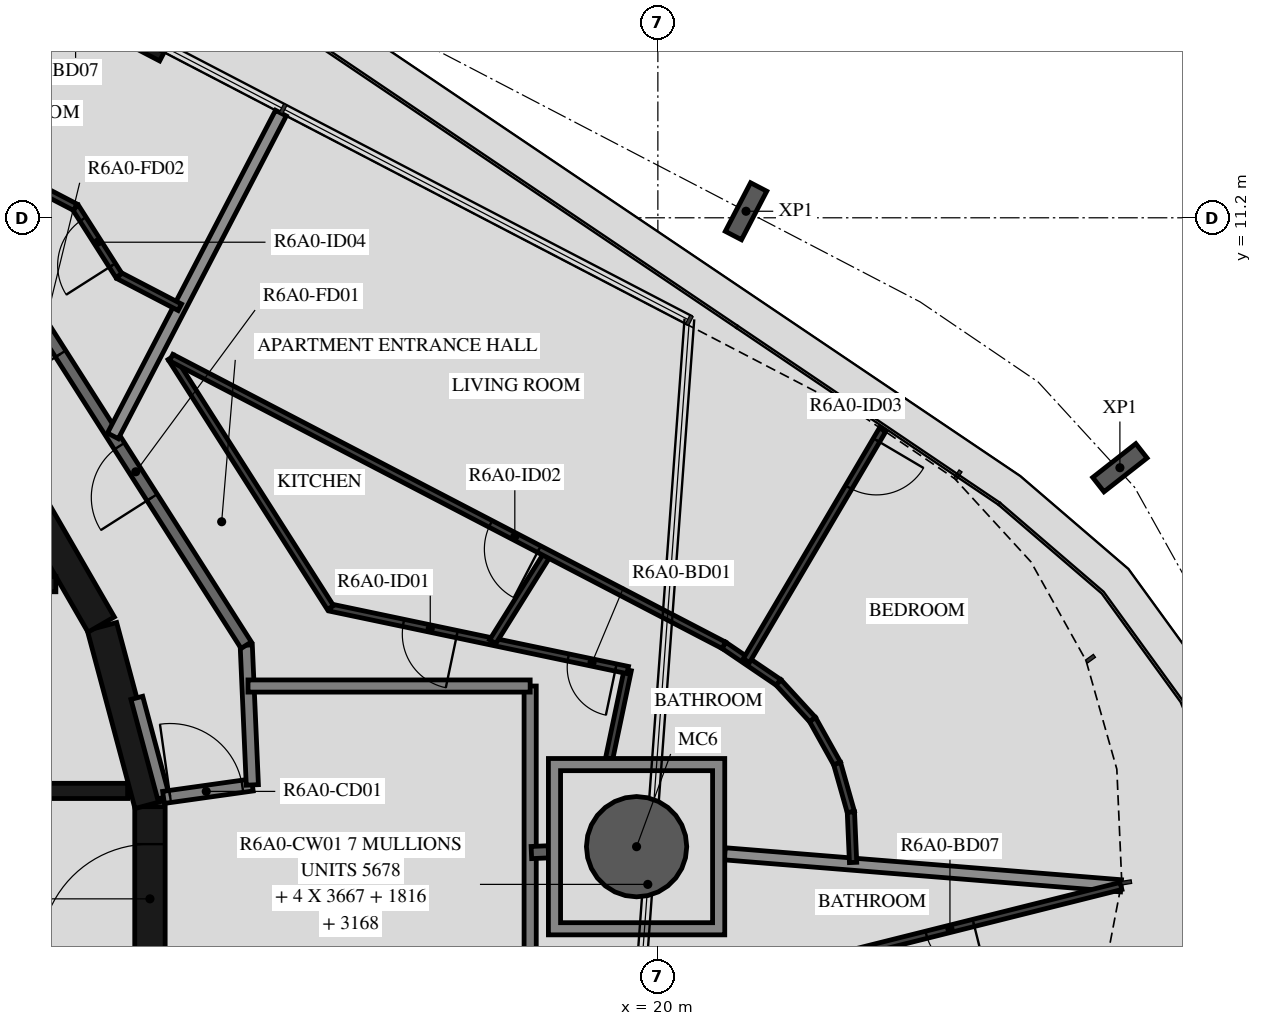
"""IFC4 building model, lengths in metres.
Left out: names, types, materials, properties, quantities, classifications, styles, units other than length and angle.
Written with IfcOpenShell. Run it as: python <this file> out.ifc"""

import sys

from ifc_helpers import new_model, si_unit, direction, frame, frame_2d, origin, origin_2d, place, context, subcontext, project, spatial, polyline, rectangle, hollow_circle, i_section, outline, extrude, element, fill, save


model = new_model("IFC4")
c1 = context("Model", 3, precision=1e-05, world=origin(), true_north=direction((0.0, 1.0)))
c2 = subcontext(c1, "Body", "Model", "MODEL_VIEW")
j1 = project(units=[si_unit("LENGTHUNIT", "METRE"), si_unit("PLANEANGLEUNIT", "RADIAN")], contexts=[c1])
p1 = place(None, origin())
s1 = spatial("IfcSite", under=j1, at=p1, CompositionType="ELEMENT")
p2 = place(p1, origin())
s2 = spatial("IfcBuilding", under=s1, at=p2, CompositionType="ELEMENT")
p3 = place(p2, frame((0.0, 0.0, 226.7)))
s3 = spatial("IfcBuildingStorey", under=s2, at=p3, CompositionType="ELEMENT", Elevation=226.7)
p4 = place(p3, frame((19.65, 0.858, -0.45), z_axis=(0.0, 0.0, 1.0), x_axis=(1.0, 0.0, 0.0)))
e1 = element("IfcColumn", 1, at=p4, inside=s3, PredefinedType="COLUMN", context=c2, shape_type="SweptSolid", body=[
    extrude(hollow_circle(Radius=0.825, WallThickness=0.04, at=origin_2d()), origin(), (0.0, 0.0, 1.0), 3.57),
])
for number, where, z_axis, x_axis in (
    (2, (27.598, 7.09, -0.45), (0.0, 0.0, 1.0), (0.617, -0.787, 0.0)),
    (3, (21.45, 11.308, -0.45), (0.0, 0.0, 1.0), (0.887, -0.462, 0.0)),
):
    element("IfcColumn", number, at=place(p3, frame(where, z_axis=z_axis, x_axis=x_axis)), inside=s3, PredefinedType="COLUMN", context=c2, shape_type="SweptSolid", body=[
        extrude(i_section(OverallWidth=0.3, OverallDepth=0.9, WebThickness=0.019, FlangeThickness=0.035, FilletRadius=0.03, at=origin_2d()), origin(), (0.0, 0.0, 1.0), 3.57),
    ])
p5 = place(p3, frame((11.844, 13.851, 0.0), z_axis=(0.0, 0.0, 1.0), x_axis=(-0.887014349583, 0.461741858221, 0.0)))
e4 = element("IfcWall", 4, at=p5, inside=s3, PredefinedType="STANDARD", context=c2, shape_type="SweptSolid", body=[
    extrude(rectangle(XDim=3.2, YDim=0.16, at=frame_2d((1.6, 0.0))), origin(), (0.0, 0.0, 1.0), 3.12),
])
p6 = place(p5, frame((0.4, 0.0, 0.0)))
e5 = element("IfcOpeningElement", 5, at=p6, cuts=e4, PredefinedType="OPENING", context=c2, shape_type="SweptSolid", body=[
    extrude(rectangle(XDim=2.4, YDim=2.4, at=frame_2d((1.2, 1.2))), frame((0.0, 0.09, 0.0), z_axis=(0.0, -1.0, 0.0), x_axis=(1.0, 0.0, 0.0)), (0.0, 0.0, 1.0), 0.18),
])
p7 = place(p3, frame((11.647, -1.516, 0.0), z_axis=(0.0, 0.0, 1.0), x_axis=(0.0, 1.0, 0.0)))
e6 = element("IfcWall", 6, at=p7, inside=s3, PredefinedType="SHEAR", context=c2, shape_type="SweptSolid", body=[
    extrude(rectangle(XDim=3.033, YDim=0.5, at=frame_2d((1.516, 0.0))), origin(), (0.0, 0.0, 1.0), 3.12),
])
p8 = place(p7, frame((0.616, 0.0, 0.0)))
e7 = element("IfcOpeningElement", 7, at=p8, cuts=e6, PredefinedType="OPENING", context=c2, shape_type="SweptSolid", body=[
    extrude(rectangle(XDim=1.8, YDim=2.1, at=frame_2d((0.9, 1.05))), frame((0.0, 0.26, 0.0), z_axis=(0.0, -1.0, 0.0), x_axis=(1.0, 0.0, 0.0)), (0.0, 0.0, 1.0), 0.52),
])
for number, where, z_axis, x_axis in (
    (8, (11.643, 1.55, 0.0), (0.0, 0.0, 1.0), (-0.259, 0.966, 0.0)),
    (9, (10.845, 4.51, 0.0), (0.0, 0.0, 1.0), (-0.5, 0.866, 0.0)),
):
    element("IfcWall", number, at=place(p3, frame(where, z_axis=z_axis, x_axis=x_axis)), inside=s3, PredefinedType="SHEAR", context=c2, shape_type="SweptSolid", body=[
        extrude(rectangle(XDim=3.033, YDim=0.5, at=frame_2d((1.516, 0.0))), origin(), (0.0, 0.0, 1.0), 3.12),
    ])
p9 = place(p3, frame((7.0, 5.175, 0.0), z_axis=(0.0, 0.0, 1.0), x_axis=(1.0, 0.0, 0.0)))
e10 = element("IfcWall", 10, at=p9, inside=s3, PredefinedType="SHEAR", context=c2, shape_type="SweptSolid", body=[
    extrude(rectangle(XDim=3.1, YDim=0.25, at=frame_2d((1.55, 0.0))), origin(), (0.0, 0.0, 1.0), 3.12),
])
p10 = place(p3, frame((3.35, 1.775, 0.0), z_axis=(0.0, 0.0, 1.0), x_axis=(1.0, 0.0, 0.0)))
e11 = element("IfcWall", 11, at=p10, inside=s3, PredefinedType="SHEAR", context=c2, shape_type="SweptSolid", body=[
    extrude(rectangle(XDim=7.93, YDim=0.25, at=frame_2d((3.965, 0.0))), origin(), (0.0, 0.0, 1.0), 3.12),
])
p11 = place(p10, frame((0.35, 0.0, 0.0)))
e12 = element("IfcOpeningElement", 12, at=p11, cuts=e11, PredefinedType="OPENING", context=c2, shape_type="SweptSolid", body=[
    extrude(rectangle(XDim=1.2, YDim=2.4, at=frame_2d((0.6, 1.2))), frame((0.0, 0.135, 0.0), z_axis=(0.0, -1.0, 0.0), x_axis=(1.0, 0.0, 0.0)), (0.0, 0.0, 1.0), 0.27),
])
p12 = place(p10, frame((2.5, 0.0, 0.0)))
e13 = element("IfcOpeningElement", 13, at=p12, cuts=e11, PredefinedType="OPENING", context=c2, shape_type="SweptSolid", body=[
    extrude(rectangle(XDim=1.2, YDim=2.4, at=frame_2d((0.6, 1.2))), frame((0.0, 0.135, 0.0), z_axis=(0.0, -1.0, 0.0), x_axis=(1.0, 0.0, 0.0)), (0.0, 0.0, 1.0), 0.27),
])
p13 = place(p10, frame((4.8, 0.0, 0.0)))
e14 = element("IfcOpeningElement", 14, at=p13, cuts=e11, PredefinedType="OPENING", context=c2, shape_type="SweptSolid", body=[
    extrude(rectangle(XDim=0.9, YDim=2.1, at=frame_2d((0.45, 1.05))), frame((0.0, 0.135, 0.0), z_axis=(0.0, -1.0, 0.0), x_axis=(1.0, 0.0, 0.0)), (0.0, 0.0, 1.0), 0.27),
])
p14 = place(p3, frame((11.87, 1.668, 0.0), z_axis=(0.0, 0.0, 1.0), x_axis=(-0.258836880648, 0.965921047093, 0.0)))
e15 = element("IfcWall", 15, at=p14, inside=s3, PredefinedType="STANDARD", context=c2, shape_type="SweptSolid", body=[
    extrude(rectangle(XDim=1.695, YDim=0.2, at=frame_2d((0.848, 0.0))), origin(), (0.0, 0.0, 1.0), 3.12),
])
p15 = place(p3, frame((11.87, 1.668, 0.0), z_axis=(0.0, 0.0, 1.0), x_axis=(0.990267985606, 0.139173692496, 0.0)))
e16 = element("IfcWall", 16, at=p15, inside=s3, PredefinedType="STANDARD", context=c2, shape_type="SweptSolid", body=[
    extrude(rectangle(XDim=1.475, YDim=0.2, at=frame_2d((0.738, 0.0))), origin(), (0.0, 0.0, 1.0), 3.12),
])
p16 = place(p15, frame((0.11, 0.0, 0.0)))
e17 = element("IfcOpeningElement", 17, at=p16, cuts=e16, PredefinedType="OPENING", context=c2, shape_type="SweptSolid", body=[
    extrude(rectangle(XDim=1.2, YDim=2.1, at=frame_2d((0.6, 1.05))), frame((0.0, 0.11, 0.0), z_axis=(0.0, -1.0, 0.0), x_axis=(1.0, 0.0, 0.0)), (0.0, 0.0, 1.0), 0.22),
])
p17 = place(p3, frame((13.331, 1.874, 0.0), z_axis=(0.0, 0.0, 1.0), x_axis=(-0.043621457762, 0.999048131184, 0.0)))
e18 = element("IfcWall", 18, at=p17, inside=s3, PredefinedType="STANDARD", context=c2, shape_type="SweptSolid", body=[
    extrude(rectangle(XDim=2.3, YDim=0.2, at=frame_2d((1.15, 0.0))), origin(), (0.0, 0.0, 1.0), 3.12),
])
p18 = place(p3, frame((13.231, 4.172, 0.0), z_axis=(0.0, 0.0, 1.0), x_axis=(-0.537304397561, 0.843388394728, 0.0)))
e19 = element("IfcWall", 19, at=p18, inside=s3, PredefinedType="STANDARD", context=c2, shape_type="SweptSolid", body=[
    extrude(rectangle(XDim=7.181, YDim=0.2, at=frame_2d((3.59, 0.0))), origin(), (0.0, 0.0, 1.0), 3.12),
])
p19 = place(p18, frame((2.881, 0.0, 0.0)))
e20 = element("IfcOpeningElement", 20, at=p19, cuts=e19, PredefinedType="OPENING", context=c2, shape_type="SweptSolid", body=[
    extrude(rectangle(XDim=1.0, YDim=2.1, at=frame_2d((0.5, 1.05))), frame((0.0, 0.11, 0.0), z_axis=(0.0, -1.0, 0.0), x_axis=(1.0, 0.0, 0.0)), (0.0, 0.0, 1.0), 0.22),
])
p20 = place(p18, frame((5.681, 0.0, 0.0)))
e21 = element("IfcOpeningElement", 21, at=p20, cuts=e19, PredefinedType="OPENING", context=c2, shape_type="SweptSolid", body=[
    extrude(rectangle(XDim=1.0, YDim=2.1, at=frame_2d((0.5, 1.05))), frame((0.0, 0.11, 0.0), z_axis=(0.0, -1.0, 0.0), x_axis=(1.0, 0.0, 0.0)), (0.0, 0.0, 1.0), 0.22),
])
p21 = place(p3, frame((17.9, -1.772, 0.0), z_axis=(0.0, 0.0, 1.0), x_axis=(0.0, 1.0, 0.0)))
e22 = element("IfcWall", 22, at=p21, inside=s3, PredefinedType="STANDARD", context=c2, shape_type="SweptSolid", body=[
    extrude(rectangle(XDim=5.272, YDim=0.2, at=frame_2d((2.636, 0.0))), origin(), (0.0, 0.0, 1.0), 3.12),
])
p22 = place(p3, frame((17.9, 3.5, 0.0), z_axis=(0.0, 0.0, 1.0), x_axis=(-1.0, 0.0, 0.0)))
e23 = element("IfcWall", 23, at=p22, inside=s3, PredefinedType="STANDARD", context=c2, shape_type="SweptSolid", body=[
    extrude(rectangle(XDim=4.64, YDim=0.2, at=frame_2d((2.32, 0.0))), origin(), (0.0, 0.0, 1.0), 3.12),
])
p23 = place(p3, frame((13.801, 12.922, 0.0), z_axis=(0.0, 0.0, 1.0), x_axis=(-0.461726485624, -0.887022351733, 0.0)))
e24 = element("IfcWall", 24, at=p23, inside=s3, PredefinedType="STANDARD", context=c2, shape_type="SweptSolid", body=[
    extrude(rectangle(XDim=5.984, YDim=0.2, at=frame_2d((2.992, 0.0))), origin(), (0.0, 0.0, 1.0), 2.73),
])
p24 = place(p3, frame((17.92, 0.761, 0.0), z_axis=(0.0, 0.0, 1.0), x_axis=(0.999051221661, 0.04355061995, 0.0)))
e25 = element("IfcWall", 25, at=p24, inside=s3, PredefinedType="STANDARD", context=c2, shape_type="SweptSolid", body=[
    extrude(rectangle(XDim=0.28, YDim=0.2, at=frame_2d((0.14, 0.0))), origin(), (0.0, 0.0, 1.0), 3.12),
])
p25 = place(p3, frame((21.1, 0.741, 0.0), z_axis=(0.0, 0.0, 1.0), x_axis=(0.996750718609, -0.080548153006, 0.0)))
e26 = element("IfcWall", 26, at=p25, inside=s3, PredefinedType="STANDARD", context=c2, shape_type="SweptSolid", body=[
    extrude(rectangle(XDim=6.538, YDim=0.2, at=frame_2d((3.269, 0.0))), origin(), (0.0, 0.0, 1.0), 2.73),
])
p26 = place(p3, frame((19.199, 2.308, 0.0), z_axis=(0.0, 0.0, 1.0), x_axis=(0.205580140246, 0.978640284239, 0.0)))
e27 = element("IfcWall", 27, at=p26, inside=s3, PredefinedType="PARTITIONING", context=c2, shape_type="SweptSolid", body=[
    extrude(rectangle(XDim=1.487, YDim=0.12, at=frame_2d((0.743, 0.0))), origin(), (0.0, 0.0, 1.0), 3.12),
])
p27 = place(p3, frame((19.505, 3.763, 0.0), z_axis=(0.0, 0.0, 1.0), x_axis=(-0.978660081285, 0.205485876157, 0.0)))
e28 = element("IfcWall", 28, at=p27, inside=s3, PredefinedType="PARTITIONING", context=c2, shape_type="SweptSolid", body=[
    extrude(rectangle(XDim=4.996, YDim=0.12, at=frame_2d((2.498, 0.0))), origin(), (0.0, 0.0, 1.0), 3.12),
])
p28 = place(p27, frame((0.2, 0.0, 0.0)))
e29 = element("IfcOpeningElement", 29, at=p28, cuts=e28, PredefinedType="OPENING", context=c2, shape_type="SweptSolid", body=[
    extrude(rectangle(XDim=0.8, YDim=2.1, at=frame_2d((0.4, 1.05))), frame((0.0, 0.07, 0.0), z_axis=(0.0, -1.0, 0.0), x_axis=(1.0, 0.0, 0.0)), (0.0, 0.0, 1.0), 0.14),
])
p29 = place(p27, frame((2.869, 0.0, 0.0)))
e30 = element("IfcOpeningElement", 30, at=p29, cuts=e28, PredefinedType="OPENING", context=c2, shape_type="SweptSolid", body=[
    extrude(rectangle(XDim=0.9, YDim=2.1, at=frame_2d((0.45, 1.05))), frame((0.0, 0.07, 0.0), z_axis=(0.0, -1.0, 0.0), x_axis=(1.0, 0.0, 0.0)), (0.0, 0.0, 1.0), 0.14),
])
p30 = place(p3, frame((14.615, 4.79, 0.0), z_axis=(0.0, 0.0, 1.0), x_axis=(-0.537312928062, 0.843382960071, 0.0)))
e31 = element("IfcWall", 31, at=p30, inside=s3, PredefinedType="PARTITIONING", context=c2, shape_type="SweptSolid", body=[
    extrude(rectangle(XDim=4.875, YDim=0.12, at=frame_2d((2.437, 0.0))), origin(), (0.0, 0.0, 1.0), 3.12),
])
p31 = place(p3, frame((21.085, 4.169, 0.0), z_axis=(0.0, 0.0, 1.0), x_axis=(0.827390024541, -0.561627765776, 0.0)))
e32 = element("IfcWall", 32, at=p31, inside=s3, PredefinedType="PARTITIONING", context=c2, shape_type="SweptSolid", body=[
    extrude(rectangle(XDim=1.087, YDim=0.12, at=frame_2d((0.543, 0.0))), origin(), (0.0, 0.0, 1.0), 3.12),
])
p32 = place(p3, frame((21.984, 3.559, 0.0), z_axis=(0.0, 0.0, 1.0), x_axis=(0.675497816835, -0.737361986715, 0.0)))
e33 = element("IfcWall", 33, at=p32, inside=s3, PredefinedType="PARTITIONING", context=c2, shape_type="SweptSolid", body=[
    extrude(rectangle(XDim=0.829, YDim=0.12, at=frame_2d((0.415, 0.0))), origin(), (0.0, 0.0, 1.0), 3.12),
])
p33 = place(p3, frame((22.544, 2.948, 0.0), z_axis=(0.0, 0.0, 1.0), x_axis=(0.487392269075, -0.873183128585, 0.0)))
e34 = element("IfcWall", 34, at=p33, inside=s3, PredefinedType="PARTITIONING", context=c2, shape_type="SweptSolid", body=[
    extrude(rectangle(XDim=0.829, YDim=0.12, at=frame_2d((0.415, 0.0))), origin(), (0.0, 0.0, 1.0), 3.12),
])
for number, where, z_axis, x_axis in (
    (35, (22.948, 2.224, 0.0), (0.0, 0.0, 1.0), (0.273, -0.962, 0.0)),
    (36, (23.174, 1.427, 0.0), (0.0, 0.0, 1.0), (0.044, -0.999, 0.0)),
):
    element("IfcWall", number, at=place(p3, frame(where, z_axis=z_axis, x_axis=x_axis)), inside=s3, PredefinedType="PARTITIONING", context=c2, shape_type="SweptSolid", body=[
        extrude(rectangle(XDim=0.829, YDim=0.12, at=frame_2d((0.415, 0.0))), origin(), (0.0, 0.0, 1.0), 3.12),
    ])
p34 = place(p3, frame((23.696, 7.715, 0.0), z_axis=(0.0, 0.0, 1.0), x_axis=(-0.508219920645, -0.861227329025, 0.0)))
e37 = element("IfcWall", 37, at=p34, inside=s3, PredefinedType="PARTITIONING", context=c2, shape_type="SweptSolid", body=[
    extrude(rectangle(XDim=4.409, YDim=0.12, at=frame_2d((2.205, 0.0))), origin(), (0.0, 0.0, 1.0), 3.12),
])
p35 = place(p34, frame((0.2, 0.0, 0.0)))
e38 = element("IfcOpeningElement", 38, at=p35, cuts=e37, PredefinedType="OPENING", context=c2, shape_type="SweptSolid", body=[
    extrude(rectangle(XDim=0.9, YDim=2.1, at=frame_2d((0.45, 1.05))), frame((0.0, 0.07, 0.0), z_axis=(0.0, -1.0, 0.0), x_axis=(1.0, 0.0, 0.0)), (0.0, 0.0, 1.0), 0.14),
])
p36 = place(p3, frame((18.189, 5.677, 0.0), z_axis=(0.0, 0.0, 1.0), x_axis=(-0.529639004581, -0.848223157445, 0.0)))
e39 = element("IfcWall", 39, at=p36, inside=s3, PredefinedType="PARTITIONING", context=c2, shape_type="SweptSolid", body=[
    extrude(rectangle(XDim=1.707, YDim=0.12, at=frame_2d((0.854, 0.0))), origin(), (0.0, 0.0, 1.0), 3.12),
])
p37 = place(p3, frame((21.085, 4.169, 0.0), z_axis=(0.0, 0.0, 1.0), x_axis=(-0.887017373034, 0.461736050071, 0.0)))
e40 = element("IfcWall", 40, at=p37, inside=s3, PredefinedType="PARTITIONING", context=c2, shape_type="SweptSolid", body=[
    extrude(rectangle(XDim=10.247, YDim=0.12, at=frame_2d((5.123, 0.0))), origin(), (0.0, 0.0, 1.0), 3.12),
])
p38 = place(p37, frame((3.425, 0.0, 0.0)))
e41 = element("IfcOpeningElement", 41, at=p38, cuts=e40, PredefinedType="OPENING", context=c2, shape_type="SweptSolid", body=[
    extrude(rectangle(XDim=0.9, YDim=2.1, at=frame_2d((0.45, 1.05))), frame((0.0, 0.07, 0.0), z_axis=(0.0, -1.0, 0.0), x_axis=(1.0, 0.0, 0.0)), (0.0, 0.0, 1.0), 0.14),
])
p39 = place(p3, frame((12.139, 9.729, 0.0), z_axis=(0.0, 0.0, 1.0), x_axis=(-0.887046876331, 0.461679368383, 0.0)))
e42 = element("IfcWall", 42, at=p39, inside=s3, PredefinedType="PARTITIONING", context=c2, shape_type="SweptSolid", body=[
    extrude(rectangle(XDim=1.13, YDim=0.12, at=frame_2d((0.565, 0.0))), origin(), (0.0, 0.0, 1.0), 3.12),
])
p40 = place(p3, frame((11.137, 10.25, 0.0), z_axis=(0.0, 0.0, 1.0), x_axis=(-0.537231369635, 0.843434914786, 0.0)))
e43 = element("IfcWall", 43, at=p40, inside=s3, PredefinedType="PARTITIONING", context=c2, shape_type="SweptSolid", body=[
    extrude(rectangle(XDim=1.332, YDim=0.12, at=frame_2d((0.666, 0.0))), origin(), (0.0, 0.0, 1.0), 3.12),
])
p41 = place(p40, frame((0.2, 0.0, 0.0)))
e44 = element("IfcOpeningElement", 44, at=p41, cuts=e43, PredefinedType="OPENING", context=c2, shape_type="SweptSolid", body=[
    extrude(rectangle(XDim=0.9, YDim=2.1, at=frame_2d((0.45, 1.05))), frame((0.0, 0.07, 0.0), z_axis=(0.0, -1.0, 0.0), x_axis=(1.0, 0.0, 0.0)), (0.0, 0.0, 1.0), 0.14),
])
p42 = place(p3, frame((10.421, 11.373, 0.0), z_axis=(0.0, 0.0, 1.0), x_axis=(-0.887012970857, 0.461744506769, 0.0)))
e45 = element("IfcWall", 45, at=p42, inside=s3, PredefinedType="PARTITIONING", context=c2, shape_type="SweptSolid", body=[
    extrude(rectangle(XDim=7.985, YDim=0.12, at=frame_2d((3.992, 0.0))), origin(), (0.0, 0.0, 1.0), 3.12),
])
p43 = place(p42, frame((5.448, 0.0, 0.0)))
e46 = element("IfcOpeningElement", 46, at=p43, cuts=e45, PredefinedType="OPENING", context=c2, shape_type="SweptSolid", body=[
    extrude(rectangle(XDim=0.9, YDim=2.1, at=frame_2d((0.45, 1.05))), frame((0.0, 0.07, 0.0), z_axis=(0.0, -1.0, 0.0), x_axis=(1.0, 0.0, 0.0)), (0.0, 0.0, 1.0), 0.14),
])
p44 = place(p3, frame((27.616, 0.212, 0.0), z_axis=(0.0, 0.0, 1.0), x_axis=(-0.969995609005, -0.243122435227, 0.0)))
e47 = element("IfcWall", 47, at=p44, inside=s3, PredefinedType="PARTITIONING", context=c2, shape_type="SweptSolid", body=[
    extrude(rectangle(XDim=8.81, YDim=0.12, at=frame_2d((4.405, 0.0))), origin(), (0.0, 0.0, 1.0), 3.12),
])
p45 = place(p44, frame((2.5, 0.0, 0.0)))
e48 = element("IfcOpeningElement", 48, at=p45, cuts=e47, PredefinedType="OPENING", context=c2, shape_type="SweptSolid", body=[
    extrude(rectangle(XDim=0.8, YDim=2.1, at=frame_2d((0.4, 1.05))), frame((0.0, 0.07, 0.0), z_axis=(0.0, -1.0, 0.0), x_axis=(1.0, 0.0, 0.0)), (0.0, 0.0, 1.0), 0.14),
])
p46 = place(p3, origin())
e49 = element("IfcWall", 49, at=p46, inside=s3, PredefinedType="STANDARD", context=c2, shape_type="SweptSolid", body=[
    extrude(outline(polyline([(21.1, 2.308), (21.1, -0.592), (18.2, -0.592), (18.2, 2.308), (21.1, 2.308)]), holes=[polyline([(18.4, -0.392), (20.9, -0.392), (20.9, 2.108), (18.4, 2.108), (18.4, -0.392)])]), origin(), (0.0, 0.0, 1.0), 3.12),
])
p47 = place(p8, origin())
e50 = element("IfcDoor", 50, at=p47, inside=s3, OperationType="DOUBLE_DOOR_SINGLE_SWING", PredefinedType="DOOR", context=c2, shape_type="SweptSolid", body=[
    extrude(rectangle(XDim=1.8, YDim=2.1, at=frame_2d((0.9, 1.05))), frame((0.0, 0.025, 0.0), z_axis=(0.0, -1.0, 0.0), x_axis=(1.0, 0.0, 0.0)), (0.0, 0.0, 1.0), 0.05),
])
fill(e7, e50)
p48 = place(p19, origin())
e51 = element("IfcDoor", 51, at=p48, inside=s3, OperationType="SINGLE_SWING_LEFT", PredefinedType="DOOR", context=c2, shape_type="SweptSolid", body=[
    extrude(rectangle(XDim=1.0, YDim=2.1, at=frame_2d((0.5, 1.05))), frame((0.0, 0.025, 0.0), z_axis=(0.0, -1.0, 0.0), x_axis=(1.0, 0.0, 0.0)), (0.0, 0.0, 1.0), 0.05),
])
fill(e20, e51)
p49 = place(p28, origin())
e52 = element("IfcDoor", 52, at=p49, inside=s3, OperationType="SINGLE_SWING_LEFT", PredefinedType="DOOR", context=c2, shape_type="SweptSolid", body=[
    extrude(rectangle(XDim=0.8, YDim=2.1, at=frame_2d((0.4, 1.05))), frame((0.0, 0.025, 0.0), z_axis=(0.0, -1.0, 0.0), x_axis=(1.0, 0.0, 0.0)), (0.0, 0.0, 1.0), 0.05),
])
fill(e29, e52)
p50 = place(p29, origin())
e53 = element("IfcDoor", 53, at=p50, inside=s3, OperationType="SINGLE_SWING_LEFT", PredefinedType="DOOR", context=c2, shape_type="SweptSolid", body=[
    extrude(rectangle(XDim=0.9, YDim=2.1, at=frame_2d((0.45, 1.05))), frame((0.0, 0.025, 0.0), z_axis=(0.0, -1.0, 0.0), x_axis=(1.0, 0.0, 0.0)), (0.0, 0.0, 1.0), 0.05),
])
fill(e30, e53)
p51 = place(p38, origin())
e54 = element("IfcDoor", 54, at=p51, inside=s3, OperationType="SINGLE_SWING_LEFT", PredefinedType="DOOR", context=c2, shape_type="SweptSolid", body=[
    extrude(rectangle(XDim=0.9, YDim=2.1, at=frame_2d((0.45, 1.05))), frame((0.0, 0.025, 0.0), z_axis=(0.0, -1.0, 0.0), x_axis=(1.0, 0.0, 0.0)), (0.0, 0.0, 1.0), 0.05),
])
fill(e41, e54)
p52 = place(p35, origin())
e55 = element("IfcDoor", 55, at=p52, inside=s3, OperationType="SINGLE_SWING_LEFT", PredefinedType="DOOR", context=c2, shape_type="SweptSolid", body=[
    extrude(rectangle(XDim=0.9, YDim=2.1, at=frame_2d((0.45, 1.05))), frame((0.0, 0.025, 0.0), z_axis=(0.0, -1.0, 0.0), x_axis=(1.0, 0.0, 0.0)), (0.0, 0.0, 1.0), 0.05),
])
fill(e38, e55)
p53 = place(p20, origin())
e56 = element("IfcDoor", 56, at=p53, inside=s3, OperationType="SINGLE_SWING_LEFT", PredefinedType="DOOR", context=c2, shape_type="SweptSolid", body=[
    extrude(rectangle(XDim=1.0, YDim=2.1, at=frame_2d((0.5, 1.05))), frame((0.0, 0.025, 0.0), z_axis=(0.0, -1.0, 0.0), x_axis=(1.0, 0.0, 0.0)), (0.0, 0.0, 1.0), 0.05),
])
fill(e21, e56)
p54 = place(p41, origin())
e57 = element("IfcDoor", 57, at=p54, inside=s3, OperationType="SINGLE_SWING_LEFT", PredefinedType="DOOR", context=c2, shape_type="SweptSolid", body=[
    extrude(rectangle(XDim=0.9, YDim=2.1, at=frame_2d((0.45, 1.05))), frame((0.0, 0.025, 0.0), z_axis=(0.0, -1.0, 0.0), x_axis=(1.0, 0.0, 0.0)), (0.0, 0.0, 1.0), 0.05),
])
fill(e44, e57)
p55 = place(p45, origin())
e58 = element("IfcDoor", 58, at=p55, inside=s3, OperationType="SINGLE_SWING_RIGHT", PredefinedType="DOOR", context=c2, shape_type="SweptSolid", body=[
    extrude(rectangle(XDim=0.8, YDim=2.1, at=frame_2d((0.4, 1.05))), frame((0.0, 0.025, 0.0), z_axis=(0.0, -1.0, 0.0), x_axis=(1.0, 0.0, 0.0)), (0.0, 0.0, 1.0), 0.05),
])
fill(e48, e58)
p56 = place(p16, origin())
e59 = element("IfcDoor", 59, at=p56, inside=s3, OperationType="DOUBLE_DOOR_SINGLE_SWING", PredefinedType="DOOR", context=c2, shape_type="SweptSolid", body=[
    extrude(rectangle(XDim=1.2, YDim=2.1, at=frame_2d((0.6, 1.05))), frame((0.0, 0.025, 0.0), z_axis=(0.0, -1.0, 0.0), x_axis=(1.0, 0.0, 0.0)), (0.0, 0.0, 1.0), 0.05),
])
fill(e17, e59)
save(model, sys.argv[1])
